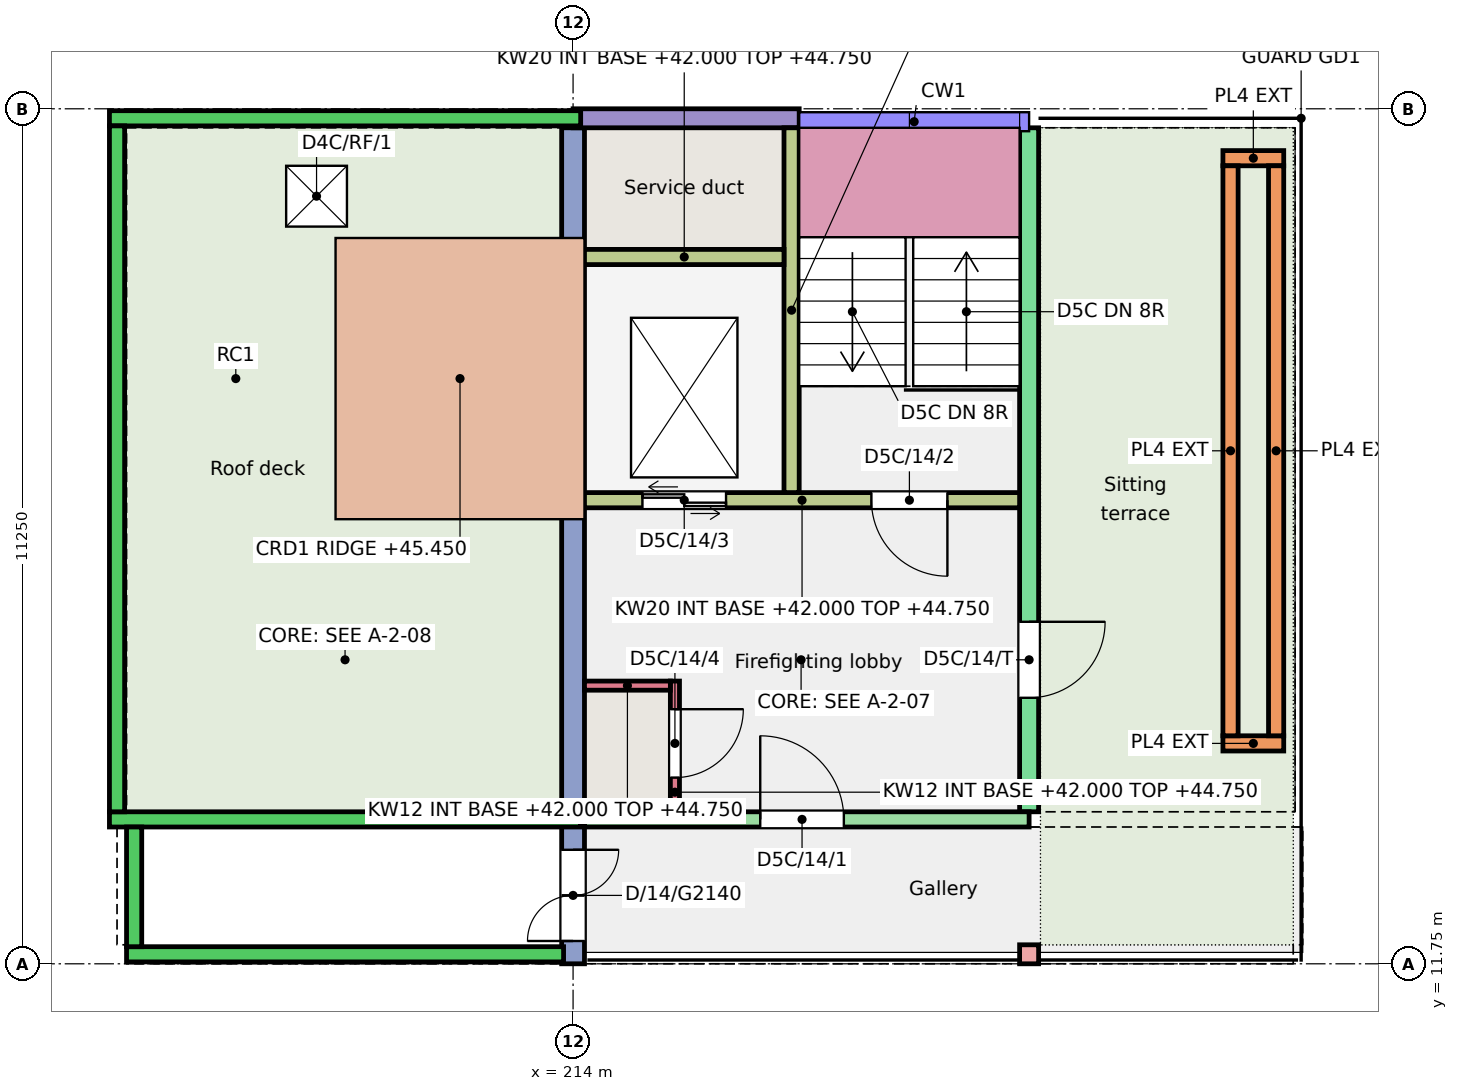
"""IFC4 building model, lengths in metres.
Left out: names, types, materials, properties, quantities, classifications, styles, units other than length and angle.
Written with IfcOpenShell. Run it as: python <this file> out.ifc"""

import sys

from ifc_helpers import new_model, si_unit, direction, frame, frame_2d, origin, origin_2d, place, context, subcontext, project, spatial, rectangle, extrude, element, fill, save


model = new_model("IFC4")
c1 = context("Model", 3, precision=1e-05, world=origin(), true_north=direction((0.0, 1.0)))
c2 = subcontext(c1, "Body", "Model", "MODEL_VIEW")
j1 = project(units=[si_unit("LENGTHUNIT", "METRE"), si_unit("PLANEANGLEUNIT", "RADIAN")], contexts=[c1])
p1 = place(None, origin())
s1 = spatial("IfcSite", under=j1, at=p1, CompositionType="ELEMENT")
p2 = place(p1, origin())
s2 = spatial("IfcBuilding", under=s1, at=p2, CompositionType="ELEMENT")
p3 = place(p2, frame((0.0, 0.0, 42.0)))
s3 = spatial("IfcBuildingStorey", under=s2, at=p3, CompositionType="ELEMENT", Elevation=42.0)
p4 = place(p3, frame((214.0, 11.75, 0.0), z_axis=(0.0, 0.0, 1.0), x_axis=(0.0, 1.0, 0.0)))
e1 = element("IfcWall", 1, at=p4, inside=s3, PredefinedType="SHEAR", context=c2, shape_type="SweptSolid", body=[
    extrude(rectangle(XDim=11.0, YDim=0.3, at=frame_2d((5.5, 0.0))), origin(), (0.0, 0.0, 1.0), 3.0),
])
p5 = place(p4, frame((0.3, 0.0, 0.0)))
e2 = element("IfcOpeningElement", 2, at=p5, cuts=e1, PredefinedType="OPENING", context=c2, shape_type="SweptSolid", body=[
    extrude(rectangle(XDim=1.2, YDim=2.1, at=frame_2d((0.6, 1.05))), frame((0.0, 0.16, 0.0), z_axis=(0.0, -1.0, 0.0), x_axis=(1.0, 0.0, 0.0)), (0.0, 0.0, 1.0), 0.32),
])
p6 = place(p3, frame((220.0, 13.75, 0.0), z_axis=(0.0, 0.0, 1.0), x_axis=(0.0, 1.0, 0.0)))
e3 = element("IfcWall", 3, at=p6, inside=s3, PredefinedType="SHEAR", context=c2, shape_type="SweptSolid", body=[
    extrude(rectangle(XDim=9.0, YDim=0.25, at=frame_2d((4.5, 0.0))), origin(), (0.0, 0.0, 1.0), 3.0),
])
p7 = place(p6, frame((1.5, 0.0, 0.0)))
e4 = element("IfcOpeningElement", 4, at=p7, cuts=e3, PredefinedType="OPENING", context=c2, shape_type="SweptSolid", body=[
    extrude(rectangle(XDim=1.0, YDim=2.1, at=frame_2d((0.5, 1.05))), frame((0.0, 0.135, 0.0), z_axis=(0.0, -1.0, 0.0), x_axis=(1.0, 0.0, 0.0)), (0.0, 0.0, 1.0), 0.27),
])
p8 = place(p3, frame((214.0, 22.875, 0.0), z_axis=(0.0, 0.0, 1.0), x_axis=(1.0, 0.0, 0.0)))
e5 = element("IfcWall", 5, at=p8, inside=s3, PredefinedType="SOLIDWALL", context=c2, shape_type="SweptSolid", body=[
    extrude(rectangle(XDim=2.975, YDim=0.25, at=frame_2d((1.488, 0.0))), origin(), (0.0, 0.0, 1.0), 3.0),
])
p9 = place(p3, frame((214.15, 13.65, 0.0), z_axis=(0.0, 0.0, 1.0), x_axis=(1.0, 0.0, 0.0)))
e6 = element("IfcWall", 6, at=p9, inside=s3, PredefinedType="SHEAR", context=c2, shape_type="SweptSolid", body=[
    extrude(rectangle(XDim=5.85, YDim=0.2, at=frame_2d((2.925, 0.0))), origin(), (0.0, 0.0, 1.0), 2.75),
])
p10 = place(p9, frame((2.312, 0.0, 0.0)))
e7 = element("IfcOpeningElement", 7, at=p10, cuts=e6, PredefinedType="OPENING", context=c2, shape_type="SweptSolid", body=[
    extrude(rectangle(XDim=1.1, YDim=2.1, at=frame_2d((0.55, 1.05))), frame((0.0, 0.11, 0.0), z_axis=(0.0, -1.0, 0.0), x_axis=(1.0, 0.0, 0.0)), (0.0, 0.0, 1.0), 0.22),
])
p11 = place(p3, frame((214.15, 17.85, 0.0), z_axis=(0.0, 0.0, 1.0), x_axis=(1.0, 0.0, 0.0)))
e8 = element("IfcWall", 8, at=p11, inside=s3, PredefinedType="SHEAR", context=c2, shape_type="SweptSolid", body=[
    extrude(rectangle(XDim=5.725, YDim=0.2, at=frame_2d((2.863, 0.0))), origin(), (0.0, 0.0, 1.0), 2.75),
])
p12 = place(p11, frame((3.775, 0.0, 0.0)))
e9 = element("IfcOpeningElement", 9, at=p12, cuts=e8, PredefinedType="OPENING", context=c2, shape_type="SweptSolid", body=[
    extrude(rectangle(XDim=1.0, YDim=2.1, at=frame_2d((0.5, 1.05))), frame((0.0, 0.11, 0.0), z_axis=(0.0, -1.0, 0.0), x_axis=(1.0, 0.0, 0.0)), (0.0, 0.0, 1.0), 0.22),
])
p13 = place(p11, frame((0.762, 0.0, 0.0)))
e10 = element("IfcOpeningElement", 10, at=p13, cuts=e8, PredefinedType="OPENING", context=c2, shape_type="SweptSolid", body=[
    extrude(rectangle(XDim=1.1, YDim=2.1, at=frame_2d((0.55, 1.05))), frame((0.0, 0.11, 0.0), z_axis=(0.0, -1.0, 0.0), x_axis=(1.0, 0.0, 0.0)), (0.0, 0.0, 1.0), 0.22),
])
p14 = place(p3, frame((216.875, 17.95, 0.0), z_axis=(0.0, 0.0, 1.0), x_axis=(0.0, 1.0, 0.0)))
e11 = element("IfcWall", 11, at=p14, inside=s3, PredefinedType="SHEAR", context=c2, shape_type="SweptSolid", body=[
    extrude(rectangle(XDim=4.8, YDim=0.2, at=frame_2d((2.4, 0.0))), origin(), (0.0, 0.0, 1.0), 2.75),
])
p15 = place(p3, frame((214.15, 21.05, 0.0), z_axis=(0.0, 0.0, 1.0), x_axis=(1.0, 0.0, 0.0)))
e12 = element("IfcWall", 12, at=p15, inside=s3, PredefinedType="SHEAR", context=c2, shape_type="SweptSolid", body=[
    extrude(rectangle(XDim=2.625, YDim=0.2, at=frame_2d((1.312, 0.0))), origin(), (0.0, 0.0, 1.0), 2.75),
])
p16 = place(p3, frame((215.34, 13.75, 0.0), z_axis=(0.0, 0.0, 1.0), x_axis=(0.0, 1.0, 0.0)))
e13 = element("IfcWall", 13, at=p16, inside=s3, PredefinedType="SHEAR", context=c2, shape_type="SweptSolid", body=[
    extrude(rectangle(XDim=1.72, YDim=0.12, at=frame_2d((0.86, 0.0))), origin(), (0.0, 0.0, 1.0), 2.75),
])
p17 = place(p16, frame((0.45, 0.0, 0.0)))
e14 = element("IfcOpeningElement", 14, at=p17, cuts=e13, PredefinedType="OPENING", context=c2, shape_type="SweptSolid", body=[
    extrude(rectangle(XDim=0.9, YDim=2.1, at=frame_2d((0.45, 1.05))), frame((0.0, 0.07, 0.0), z_axis=(0.0, -1.0, 0.0), x_axis=(1.0, 0.0, 0.0)), (0.0, 0.0, 1.0), 0.14),
])
p18 = place(p3, frame((214.15, 15.41, 0.0), z_axis=(0.0, 0.0, 1.0), x_axis=(1.0, 0.0, 0.0)))
e15 = element("IfcWall", 15, at=p18, inside=s3, PredefinedType="SHEAR", context=c2, shape_type="SweptSolid", body=[
    extrude(rectangle(XDim=1.13, YDim=0.12, at=frame_2d((0.565, 0.0))), origin(), (0.0, 0.0, 1.0), 2.75),
])
p19 = place(p3, frame((220.0, 11.875, 0.0), z_axis=(0.0, 0.0, 1.0), x_axis=(1.0, 0.0, 0.0)))
e16 = element("IfcColumn", 16, at=p19, inside=s3, PredefinedType="COLUMN", context=c2, shape_type="SweptSolid", body=[
    extrude(rectangle(XDim=0.25, YDim=0.25, at=origin_2d()), origin(), (0.0, 0.0, 1.0), 3.0),
])
for number, where, z_axis, x_axis in (
    (17, (211.025, 17.85, 0.0), (0.0, 0.0, 1.0), (1.0, 0.0, 0.0)),
    (18, (211.025, 21.05, 0.0), (0.0, 0.0, 1.0), (1.0, 0.0, 0.0)),
):
    element("IfcWall", number, at=place(p3, frame(where, z_axis=z_axis, x_axis=x_axis)), inside=s3, PredefinedType="SHEAR", context=c2, shape_type="SweptSolid", body=[
        extrude(rectangle(XDim=2.825, YDim=0.2, at=frame_2d((1.413, 0.0))), origin(), (0.0, 0.0, 1.0), 1.5),
    ])
p20 = place(p3, frame((211.125, 17.95, 0.0), z_axis=(0.0, 0.0, 1.0), x_axis=(0.0, 1.0, 0.0)))
e19 = element("IfcWall", 19, at=p20, inside=s3, PredefinedType="SHEAR", context=c2, shape_type="SweptSolid", body=[
    extrude(rectangle(XDim=3.0, YDim=0.2, at=frame_2d((1.5, 0.0))), origin(), (0.0, 0.0, 1.0), 1.5),
])
for number, where, z_axis, x_axis in (
    (20, (207.9, 22.875, 0.0), (0.0, 0.0, 1.0), (1.0, 0.0, 0.0)),
    (21, (207.9, 13.65, 0.0), (0.0, 0.0, 1.0), (1.0, 0.0, 0.0)),
):
    element("IfcWall", number, at=place(p3, frame(where, z_axis=z_axis, x_axis=x_axis)), inside=s3, PredefinedType="PARAPET", context=c2, shape_type="SweptSolid", body=[
        extrude(rectangle(XDim=6.2, YDim=0.2, at=frame_2d((3.1, 0.0))), origin(), (0.0, 0.0, 1.0), 1.1),
    ])
p21 = place(p3, frame((208.0, 13.75, 0.0), z_axis=(0.0, 0.0, 1.0), x_axis=(0.0, 1.0, 0.0)))
e22 = element("IfcWall", 22, at=p21, inside=s3, PredefinedType="PARAPET", context=c2, shape_type="SweptSolid", body=[
    extrude(rectangle(XDim=9.025, YDim=0.2, at=frame_2d((4.512, 0.0))), origin(), (0.0, 0.0, 1.0), 1.1),
])
p22 = place(p3, frame((208.125, 11.875, 0.0), z_axis=(0.0, 0.0, 1.0), x_axis=(1.0, 0.0, 0.0)))
e23 = element("IfcWall", 23, at=p22, inside=s3, PredefinedType="PARAPET", context=c2, shape_type="SweptSolid", body=[
    extrude(rectangle(XDim=5.75, YDim=0.2, at=frame_2d((2.875, 0.0))), origin(), (0.0, 0.0, 1.0), 1.1),
])
p23 = place(p3, frame((208.225, 11.975, 0.0), z_axis=(0.0, 0.0, 1.0), x_axis=(0.0, 1.0, 0.0)))
e24 = element("IfcWall", 24, at=p23, inside=s3, PredefinedType="PARAPET", context=c2, shape_type="SweptSolid", body=[
    extrude(rectangle(XDim=1.575, YDim=0.2, at=frame_2d((0.788, 0.0))), origin(), (0.0, 0.0, 1.0), 1.1),
])
for number, where, z_axis, x_axis in (
    (25, (222.55, 14.65, 0.01), (0.0, 0.0, 1.0), (1.0, 0.0, 0.0)),
    (26, (222.55, 22.35, 0.01), (0.0, 0.0, 1.0), (1.0, 0.0, 0.0)),
):
    element("IfcWall", number, at=place(p3, frame(where, z_axis=z_axis, x_axis=x_axis)), inside=s3, PredefinedType="SOLIDWALL", context=c2, shape_type="SweptSolid", body=[
        extrude(rectangle(XDim=0.8, YDim=0.2, at=frame_2d((0.4, 0.0))), origin(), (0.0, 0.0, 1.0), 0.45),
    ])
for number, where, z_axis, x_axis in (
    (27, (222.65, 14.75, 0.01), (0.0, 0.0, 1.0), (0.0, 1.0, 0.0)),
    (28, (223.25, 14.75, 0.01), (0.0, 0.0, 1.0), (0.0, 1.0, 0.0)),
):
    element("IfcWall", number, at=place(p3, frame(where, z_axis=z_axis, x_axis=x_axis)), inside=s3, PredefinedType="SOLIDWALL", context=c2, shape_type="SweptSolid", body=[
        extrude(rectangle(XDim=7.5, YDim=0.2, at=frame_2d((3.75, 0.0))), origin(), (0.0, 0.0, 1.0), 0.45),
    ])
p24 = place(p3, frame((0.0, 0.0, -0.25)))
p25 = place(p24, frame((210.625, 21.85, 0.0)))
p26 = place(p25, frame((0.0, 0.0, 0.2)))
e29 = element("IfcDoor", 29, at=p26, inside=s3, OperationType="SINGLE_SWING_LEFT", PredefinedType="TRAPDOOR", context=c2, shape_type="SweptSolid", body=[
    extrude(rectangle(XDim=0.8, YDim=0.8, at=origin_2d()), origin(), (0.0, 0.0, 1.0), 0.05),
])
p27 = place(p10, origin())
e30 = element("IfcDoor", 30, at=p27, inside=s3, OperationType="SINGLE_SWING_LEFT", PredefinedType="DOOR", context=c2, shape_type="SweptSolid", body=[
    extrude(rectangle(XDim=1.1, YDim=2.1, at=frame_2d((0.55, 1.05))), frame((0.0, 0.025, 0.0), z_axis=(0.0, -1.0, 0.0), x_axis=(1.0, 0.0, 0.0)), (0.0, 0.0, 1.0), 0.05),
])
fill(e7, e30)
p28 = place(p12, origin())
e31 = element("IfcDoor", 31, at=p28, inside=s3, OperationType="SINGLE_SWING_RIGHT", PredefinedType="DOOR", context=c2, shape_type="SweptSolid", body=[
    extrude(rectangle(XDim=1.0, YDim=2.1, at=frame_2d((0.5, 1.05))), frame((0.0, 0.025, 0.0), z_axis=(0.0, -1.0, 0.0), x_axis=(1.0, 0.0, 0.0)), (0.0, 0.0, 1.0), 0.05),
])
fill(e9, e31)
p29 = place(p13, origin())
e32 = element("IfcDoor", 32, at=p29, inside=s3, OperationType="DOUBLE_DOOR_SLIDING", PredefinedType="DOOR", context=c2, shape_type="SweptSolid", body=[
    extrude(rectangle(XDim=1.1, YDim=2.1, at=frame_2d((0.55, 1.05))), frame((0.0, 0.025, 0.0), z_axis=(0.0, -1.0, 0.0), x_axis=(1.0, 0.0, 0.0)), (0.0, 0.0, 1.0), 0.05),
])
fill(e10, e32)
p30 = place(p17, origin())
e33 = element("IfcDoor", 33, at=p30, inside=s3, OperationType="SINGLE_SWING_RIGHT", PredefinedType="DOOR", context=c2, shape_type="SweptSolid", body=[
    extrude(rectangle(XDim=0.9, YDim=2.1, at=frame_2d((0.45, 1.05))), frame((0.0, 0.025, 0.0), z_axis=(0.0, -1.0, 0.0), x_axis=(1.0, 0.0, 0.0)), (0.0, 0.0, 1.0), 0.05),
])
fill(e14, e33)
p31 = place(p7, origin())
e34 = element("IfcDoor", 34, at=p31, inside=s3, OperationType="SINGLE_SWING_RIGHT", PredefinedType="DOOR", context=c2, shape_type="SweptSolid", body=[
    extrude(rectangle(XDim=1.0, YDim=2.1, at=frame_2d((0.5, 1.05))), frame((0.0, 0.025, 0.0), z_axis=(0.0, -1.0, 0.0), x_axis=(1.0, 0.0, 0.0)), (0.0, 0.0, 1.0), 0.05),
])
fill(e4, e34)
p32 = place(p5, origin())
e35 = element("IfcDoor", 35, at=p32, inside=s3, OperationType="DOUBLE_DOOR_SINGLE_SWING", PredefinedType="DOOR", context=c2, shape_type="SweptSolid", body=[
    extrude(rectangle(XDim=1.2, YDim=2.1, at=frame_2d((0.6, 1.05))), frame((0.0, 0.025, 0.0), z_axis=(0.0, -1.0, 0.0), x_axis=(1.0, 0.0, 0.0)), (0.0, 0.0, 1.0), 0.05),
])
fill(e2, e35)
save(model, sys.argv[1])
